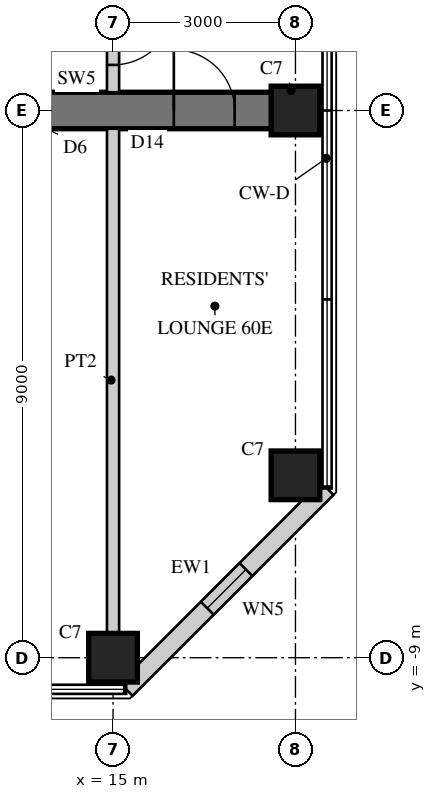
"""IFC4 building model, lengths in metres.
Left out: names, types, materials, properties, quantities, classifications, styles, units other than length and angle.
Written with IfcOpenShell. Run it as: python <this file> out.ifc"""

import sys

from ifc_helpers import new_model, si_unit, direction, frame, frame_2d, origin, origin_2d, place, context, subcontext, project, spatial, rectangle, hollow_rectangle, extrude, element, fill, save


model = new_model("IFC4")
c1 = context("Model", 3, precision=1e-05, world=origin(), true_north=direction((0.0, 1.0)))
c2 = subcontext(c1, "Body", "Model", "MODEL_VIEW")
j1 = project(units=[si_unit("LENGTHUNIT", "METRE"), si_unit("PLANEANGLEUNIT", "RADIAN")], contexts=[c1])
p1 = place(None, origin())
s1 = spatial("IfcSite", under=j1, at=p1, CompositionType="ELEMENT")
p2 = place(p1, origin())
s2 = spatial("IfcBuilding", under=s1, at=p2, CompositionType="ELEMENT")
p3 = place(p2, frame((0.0, 0.0, 235.7)))
s3 = spatial("IfcBuildingStorey", under=s2, at=p3, CompositionType="ELEMENT", Elevation=235.7)
p4 = place(p3, frame((9.0, 0.0, 0.0), z_axis=(0.0, 0.0, 1.0), x_axis=(1.0, 0.0, 0.0)))
e1 = element("IfcWall", 1, at=p4, inside=s3, PredefinedType="SHEAR", context=c2, shape_type="SweptSolid", body=[
    extrude(rectangle(XDim=9.0, YDim=0.6, at=frame_2d((4.5, 0.0))), origin(), (0.0, 0.0, 1.0), 3.4),
])
p5 = place(p4, frame((3.8, 0.0, 0.0)))
e2 = element("IfcOpeningElement", 2, at=p5, cuts=e1, PredefinedType="OPENING", context=c2, shape_type="SweptSolid", body=[
    extrude(rectangle(XDim=1.0, YDim=2.15, at=frame_2d((0.5, 1.075))), frame((0.0, 0.31, 0.0), z_axis=(0.0, -1.0, 0.0), x_axis=(1.0, 0.0, 0.0)), (0.0, 0.0, 1.0), 0.62),
])
p6 = place(p4, frame((7.0, 0.0, 0.0)))
e3 = element("IfcOpeningElement", 3, at=p6, cuts=e1, PredefinedType="OPENING", context=c2, shape_type="SweptSolid", body=[
    extrude(rectangle(XDim=1.0, YDim=2.2, at=frame_2d((0.5, 1.1))), frame((0.0, 0.31, 0.0), z_axis=(0.0, -1.0, 0.0), x_axis=(1.0, 0.0, 0.0)), (0.0, 0.0, 1.0), 0.62),
])
for number, where, z_axis, x_axis in (
    (4, (15.0, -9.0, 0.0), (0.0, 0.0, 1.0), (1.0, 0.0, 0.0)),
    (5, (18.0, -6.0, 0.0), (0.0, 0.0, 1.0), (1.0, 0.0, 0.0)),
    (6, (18.0, 0.0, 0.0), (0.0, 0.0, 1.0), (1.0, 0.0, 0.0)),
):
    element("IfcColumn", number, at=place(p3, frame(where, z_axis=z_axis, x_axis=x_axis)), inside=s3, PredefinedType="COLUMN", context=c2, shape_type="SweptSolid", body=[
        extrude(rectangle(XDim=0.8, YDim=0.8, at=origin_2d()), origin(), (0.0, 0.0, 1.0), 3.4),
    ])
p7 = place(p3, frame((15.215, -9.52, 0.0), z_axis=(0.0, 0.0, 1.0), x_axis=(0.707106781187, 0.707106781187, 0.0)))
e7 = element("IfcWall", 7, at=p7, inside=s3, PredefinedType="SOLIDWALL", context=c2, shape_type="SweptSolid", body=[
    extrude(rectangle(XDim=4.674, YDim=0.3, at=frame_2d((2.337, 0.0))), origin(), (0.0, 0.0, 1.0), 3.22),
])
p8 = place(p7, frame((1.887, 0.0, 0.3)))
e8 = element("IfcOpeningElement", 8, at=p8, cuts=e7, PredefinedType="OPENING", context=c2, shape_type="SweptSolid", body=[
    extrude(rectangle(XDim=0.9, YDim=2.4, at=frame_2d((0.45, 1.2))), frame((0.0, 0.16, 0.0), z_axis=(0.0, -1.0, 0.0), x_axis=(1.0, 0.0, 0.0)), (0.0, 0.0, 1.0), 0.32),
])
p9 = place(p3, frame((15.0, -8.6, 0.0), z_axis=(0.0, 0.0, 1.0), x_axis=(0.0, 1.0, 0.0)))
e9 = element("IfcWall", 9, at=p9, inside=s3, PredefinedType="SOLIDWALL", context=c2, shape_type="SweptSolid", body=[
    extrude(rectangle(XDim=8.3, YDim=0.2, at=frame_2d((4.15, 0.0))), origin(), (0.0, 0.0, 1.0), 2.52),
])
p10 = place(p3, frame((15.0, 0.3, 0.0), z_axis=(0.0, 0.0, 1.0), x_axis=(0.0, 1.0, 0.0)))
e10 = element("IfcWall", 10, at=p10, inside=s3, PredefinedType="SOLIDWALL", context=c2, shape_type="SweptSolid", body=[
    extrude(rectangle(XDim=8.3, YDim=0.2, at=frame_2d((4.15, 0.0))), origin(), (0.0, 0.0, 1.0), 2.52),
])
p11 = place(p10, frame((0.45, 0.0, 0.0)))
e11 = element("IfcOpeningElement", 11, at=p11, cuts=e10, PredefinedType="OPENING", context=c2, shape_type="SweptSolid", body=[
    extrude(rectangle(XDim=1.0, YDim=2.2, at=frame_2d((0.5, 1.1))), frame((0.0, 0.11, 0.0), z_axis=(0.0, -1.0, 0.0), x_axis=(1.0, 0.0, 0.0)), (0.0, 0.0, 1.0), 0.22),
])
p12 = place(p8, origin())
e12 = element("IfcWindow", 12, at=p12, inside=s3, PartitioningType="SINGLE_PANEL", PredefinedType="WINDOW", context=c2, shape_type="SweptSolid", body=[
    extrude(hollow_rectangle(XDim=0.9, YDim=2.4, WallThickness=0.06, at=frame_2d((0.45, 1.2))), frame((0.0, 0.03, 0.0), z_axis=(0.0, -1.0, 0.0), x_axis=(1.0, 0.0, 0.0)), (0.0, 0.0, 1.0), 0.06),
    extrude(rectangle(XDim=0.779, YDim=2.279, at=frame_2d((0.45, 1.2))), frame((0.0, 0.03, 0.0), z_axis=(0.0, -1.0, 0.0), x_axis=(1.0, 0.0, 0.0)), (0.0, 0.0, 1.0), 0.06),
])
fill(e8, e12)
p13 = place(p11, frame((1.0, 0.0, 0.0), z_axis=(0.0, 0.0, 1.0), x_axis=(-1.0, 0.0, 0.0)))
e13 = element("IfcDoor", 13, at=p13, inside=s3, OperationType="SINGLE_SWING_LEFT", PredefinedType="DOOR", context=c2, shape_type="SweptSolid", body=[
    extrude(rectangle(XDim=1.0, YDim=2.2, at=frame_2d((0.5, 1.1))), frame((0.0, 0.025, 0.0), z_axis=(0.0, -1.0, 0.0), x_axis=(1.0, 0.0, 0.0)), (0.0, 0.0, 1.0), 0.05),
])
fill(e11, e13)
p14 = place(p6, origin())
e14 = element("IfcDoor", 14, at=p14, inside=s3, OperationType="SINGLE_SWING_LEFT", PredefinedType="DOOR", context=c2, shape_type="SweptSolid", body=[
    extrude(rectangle(XDim=1.0, YDim=2.2, at=frame_2d((0.5, 1.1))), frame((0.0, 0.025, 0.0), z_axis=(0.0, -1.0, 0.0), x_axis=(1.0, 0.0, 0.0)), (0.0, 0.0, 1.0), 0.05),
])
fill(e3, e14)
save(model, sys.argv[1])
